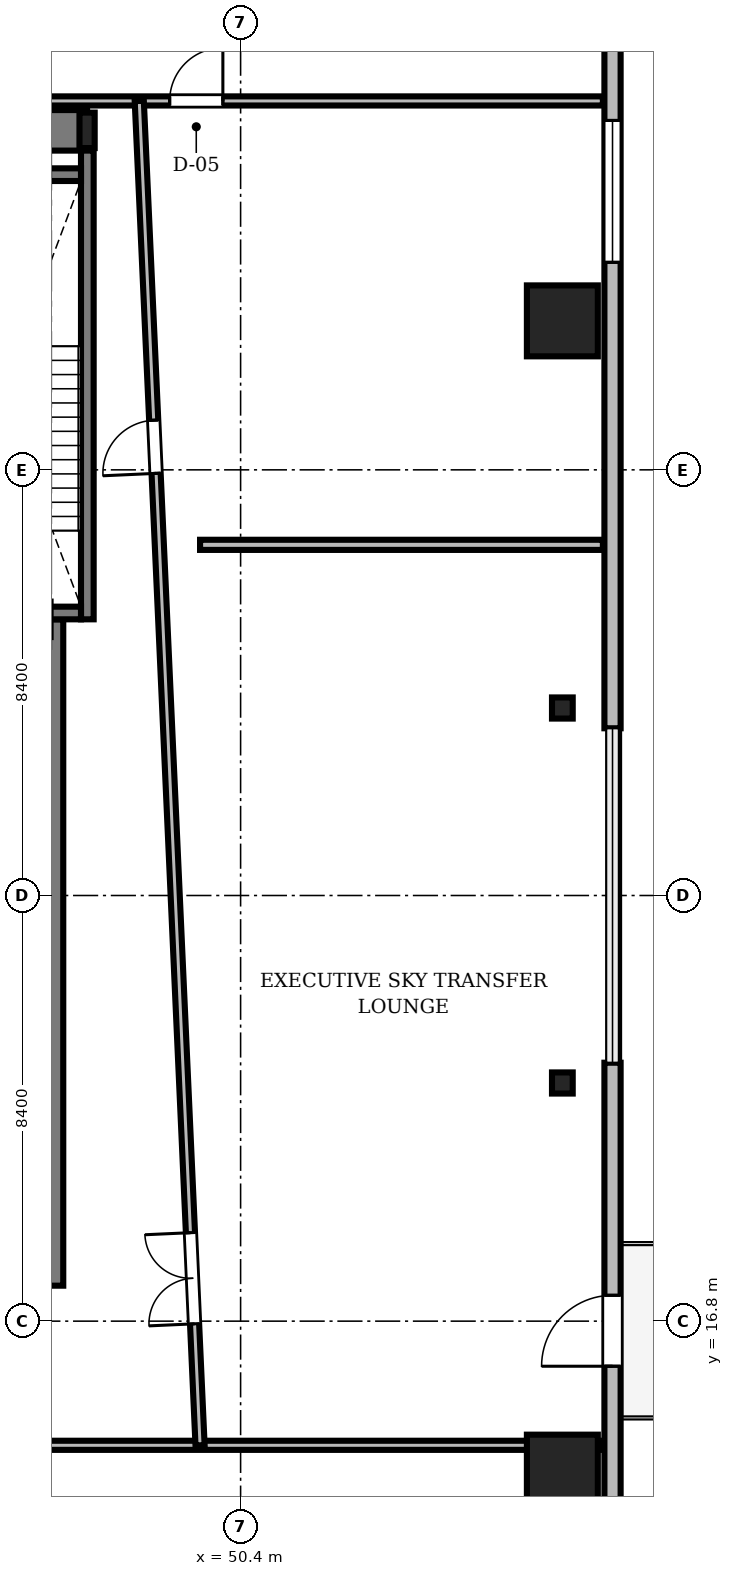
"""IFC4 building model, lengths in metres.
Left out: names, types, materials, properties, quantities, classifications, styles, units other than length and angle.
Written with IfcOpenShell. Run it as: python <this file> out.ifc"""

import sys

from ifc_helpers import new_model, si_unit, direction, frame, frame_2d, origin, origin_2d, place, context, subcontext, project, spatial, rectangle, i_section, extrude, source, transform, mapped, element, fill, save


model = new_model("IFC4")
c1 = context("Model", 3, precision=1e-05, world=origin(), true_north=direction((0.0, 1.0)))
c2 = subcontext(c1, "Body", "Model", "MODEL_VIEW")
j1 = project(units=[si_unit("LENGTHUNIT", "METRE"), si_unit("PLANEANGLEUNIT", "RADIAN")], contexts=[c1])
p1 = place(None, origin())
s1 = spatial("IfcSite", under=j1, at=p1, CompositionType="ELEMENT")
p2 = place(p1, origin())
s2 = spatial("IfcBuilding", under=s1, at=p2, CompositionType="ELEMENT")
p3 = place(p2, frame((0.0, 0.0, 172.2)))
s3 = spatial("IfcBuildingStorey", under=s2, at=p3, CompositionType="ELEMENT", Elevation=172.2)
m1 = source(origin(), c2, "Body", "SweptSolid", [
    extrude(rectangle(XDim=17.52, YDim=0.8, at=frame_2d((8.76, 0.0))), origin(), (0.0, 0.0, 1.0), 4.78),
])
p4 = place(p3, frame((29.85, 40.3, 0.0), z_axis=(0.0, 0.0, 1.0), x_axis=(1.0, 0.0, 0.0)))
e1 = element("IfcWall", 1, at=p4, inside=s3, PredefinedType="SHEAR", context=c2, shape_type="MappedRepresentation", body=[
    mapped(m1, transform((0.0, 0.0, 0.0), scale=1.0)),
])
m2 = source(origin(), c2, "Body", "SweptSolid", [
    extrude(rectangle(XDim=13.15, YDim=0.8, at=frame_2d((6.575, 0.0))), origin(), (0.0, 0.0, 1.0), 4.78),
])
p5 = place(p3, frame((46.5, 17.5, 0.0), z_axis=(0.0, 0.0, 1.0), x_axis=(0.0, 1.0, 0.0)))
e2 = element("IfcWall", 2, at=p5, inside=s3, PredefinedType="SHEAR", context=c2, shape_type="MappedRepresentation", body=[
    mapped(m2, transform((0.0, 0.0, 0.0), scale=1.0)),
])
m3 = source(origin(), c2, "Body", "SweptSolid", [
    extrude(i_section(OverallWidth=0.3, OverallDepth=0.7, WebThickness=0.017, FlangeThickness=0.032, FilletRadius=0.027, at=origin_2d()), origin(), (0.0, 0.0, 1.0), 4.78),
])
p6 = place(p3, frame((47.37, 40.3, 0.0), z_axis=(0.0, 0.0, 1.0), x_axis=(1.0, 0.0, 0.0)))
e3 = element("IfcColumn", 3, at=p6, inside=s3, PredefinedType="COLUMN", context=c2, shape_type="MappedRepresentation", body=[
    mapped(m3, transform((0.0, 0.0, 0.0), scale=1.0)),
])
m4 = source(origin(), c2, "Body", "SweptSolid", [
    extrude(rectangle(XDim=1.4, YDim=1.4, at=origin_2d()), origin(), (0.0, 0.0, 1.0), 4.78),
])
for number, where, z_axis, x_axis in (
    (4, (56.75, 13.86, 0.0), (0.0, 0.0, 1.0), (1.0, 0.0, 0.0)),
    (5, (56.75, 36.54, 0.0), (0.0, 0.0, 1.0), (1.0, 0.0, 0.0)),
):
    element("IfcColumn", number, at=place(p3, frame(where, z_axis=z_axis, x_axis=x_axis)), inside=s3, PredefinedType="COLUMN", context=c2, shape_type="MappedRepresentation", body=[
        mapped(m4, transform((0.0, 0.0, 0.0), scale=1.0)),
    ])
m5 = source(origin(), c2, "Body", "SweptSolid", [
    extrude(i_section(OverallWidth=0.409, OverallDepth=0.417, WebThickness=0.021, FlangeThickness=0.033, FilletRadius=0.015, at=origin_2d()), origin(), (0.0, 0.0, 1.0), 4.78),
])
for number, where, z_axis, x_axis in (
    (6, (56.75, 21.5, 0.0), (0.0, 0.0, 1.0), (1.0, 0.0, 0.0)),
    (7, (56.75, 28.9, 0.0), (0.0, 0.0, 1.0), (1.0, 0.0, 0.0)),
):
    element("IfcColumn", number, at=place(p3, frame(where, z_axis=z_axis, x_axis=x_axis)), inside=s3, PredefinedType="COLUMN", context=c2, shape_type="MappedRepresentation", body=[
        mapped(m5, transform((0.0, 0.0, 0.0), scale=1.0)),
    ])
m6 = source(origin(), c2, "Body", "SweptSolid", [
    extrude(rectangle(XDim=15.6, YDim=0.32, at=frame_2d((7.8, 0.0))), origin(), (0.0, 0.0, 1.0), 4.78),
])
p7 = place(p3, frame((57.74, 6.3, 0.0), z_axis=(0.0, 0.0, 1.0), x_axis=(0.0, 1.0, 0.0)))
e8 = element("IfcWall", 8, at=p7, inside=s3, PredefinedType="SOLIDWALL", context=c2, shape_type="MappedRepresentation", body=[
    mapped(m6, transform((0.0, 0.0, 0.0), scale=1.0)),
])
m7 = source(origin(), c2, "Body", "SweptSolid", [
    extrude(rectangle(XDim=1.4, YDim=2.3, at=frame_2d((0.7, 1.15))), frame((0.0, 0.17, 0.0), z_axis=(0.0, -1.0, 0.0), x_axis=(1.0, 0.0, 0.0)), (0.0, 0.0, 1.0), 0.34),
])
p8 = place(p7, frame((9.61, 0.0, 0.0)))
e9 = element("IfcOpeningElement", 9, at=p8, cuts=e8, PredefinedType="OPENING", context=c2, shape_type="MappedRepresentation", body=[
    mapped(m7, transform((0.0, 0.0, 0.0), scale=1.0)),
])
m8 = source(origin(), c2, "Body", "SweptSolid", [
    extrude(rectangle(XDim=2.8, YDim=2.4, at=frame_2d((1.4, 1.2))), frame((0.0, 0.17, 0.0), z_axis=(0.0, -1.0, 0.0), x_axis=(1.0, 0.0, 0.0)), (0.0, 0.0, 1.0), 0.34),
])
p9 = place(p7, frame((2.705, 0.0, 0.72)))
e10 = element("IfcOpeningElement", 10, at=p9, cuts=e8, PredefinedType="OPENING", context=c2, shape_type="MappedRepresentation", body=[
    mapped(m8, transform((0.0, 0.0, 0.0), scale=1.0)),
])
m9 = source(origin(), c2, "Body", "SweptSolid", [
    extrude(rectangle(XDim=15.6, YDim=0.32, at=frame_2d((7.8, 0.0))), origin(), (0.0, 0.0, 1.0), 4.78),
])
p10 = place(p3, frame((57.74, 28.5, 0.0), z_axis=(0.0, 0.0, 1.0), x_axis=(0.0, 1.0, 0.0)))
e11 = element("IfcWall", 11, at=p10, inside=s3, PredefinedType="SOLIDWALL", context=c2, shape_type="MappedRepresentation", body=[
    mapped(m9, transform((0.0, 0.0, 0.0), scale=1.0)),
])
p11 = place(p10, frame((9.195, 0.0, 0.72)))
e12 = element("IfcOpeningElement", 12, at=p11, cuts=e11, PredefinedType="OPENING", context=c2, shape_type="MappedRepresentation", body=[
    mapped(m8, transform((0.0, 0.0, 0.0), scale=1.0)),
])
m10 = source(origin(), c2, "Body", "SweptSolid", [
    extrude(rectangle(XDim=9.25, YDim=0.25, at=frame_2d((4.625, 0.0))), origin(), (0.0, 0.0, 1.0), 4.8),
])
p12 = place(p3, frame((47.375, 30.65, 0.0), z_axis=(0.0, 0.0, 1.0), x_axis=(0.0, 1.0, 0.0)))
e13 = element("IfcWall", 13, at=p12, inside=s3, PredefinedType="SOLIDWALL", context=c2, shape_type="MappedRepresentation", body=[
    mapped(m10, transform((0.0, 0.0, 0.0), scale=1.0)),
])
m11 = source(origin(), c2, "Body", "SweptSolid", [
    extrude(rectangle(XDim=3.15, YDim=0.25, at=frame_2d((1.575, 0.0))), origin(), (0.0, 0.0, 1.0), 4.8),
])
p13 = place(p3, frame((44.1, 39.425, 0.0), z_axis=(0.0, 0.0, 1.0), x_axis=(1.0, 0.0, 0.0)))
e14 = element("IfcWall", 14, at=p13, inside=s3, PredefinedType="SOLIDWALL", context=c2, shape_type="MappedRepresentation", body=[
    mapped(m11, transform((0.0, 0.0, 0.0), scale=1.0)),
])
p14 = place(p3, frame((44.1, 30.775, 0.0), z_axis=(0.0, 0.0, 1.0), x_axis=(1.0, 0.0, 0.0)))
e15 = element("IfcWall", 15, at=p14, inside=s3, PredefinedType="SOLIDWALL", context=c2, shape_type="MappedRepresentation", body=[
    mapped(m11, transform((0.0, 0.0, 0.0), scale=1.0)),
])
m12 = source(origin(), c2, "Body", "SweptSolid", [
    extrude(rectangle(XDim=1.1, YDim=2.2, at=frame_2d((0.55, 1.1))), frame((0.0, 0.135, 0.0), z_axis=(0.0, -1.0, 0.0), x_axis=(1.0, 0.0, 0.0)), (0.0, 0.0, 1.0), 0.27),
])
p15 = place(p14, frame((0.35, 0.0, 0.0)))
e16 = element("IfcOpeningElement", 16, at=p15, cuts=e15, PredefinedType="OPENING", context=c2, shape_type="MappedRepresentation", body=[
    mapped(m12, transform((0.0, 0.0, 0.0), scale=1.0)),
])
m13 = source(origin(), c2, "Body", "SweptSolid", [
    extrude(rectangle(XDim=46.1, YDim=0.18, at=frame_2d((23.05, 0.0))), origin(), (0.0, 0.0, 1.0), 4.022),
])
p16 = place(p3, frame((11.45, 14.35, 0.0), z_axis=(0.0, 0.0, 1.0), x_axis=(1.0, 0.0, 0.0)))
e17 = element("IfcWall", 17, at=p16, inside=s3, PredefinedType="PARTITIONING", context=c2, shape_type="MappedRepresentation", body=[
    mapped(m13, transform((0.0, 0.0, 0.0), scale=1.0)),
])
m14 = source(origin(), c2, "Body", "SweptSolid", [
    extrude(rectangle(XDim=1.8, YDim=2.4, at=frame_2d((0.9, 1.2))), frame((0.0, 0.1, 0.0), z_axis=(0.0, -1.0, 0.0), x_axis=(1.0, 0.0, 0.0)), (0.0, 0.0, 1.0), 0.2),
])
p17 = place(p16, frame((16.15, 0.0, 0.0)))
e18 = element("IfcOpeningElement", 18, at=p17, cuts=e17, PredefinedType="OPENING", context=c2, shape_type="MappedRepresentation", body=[
    mapped(m14, transform((0.0, 0.0, 0.0), scale=1.0)),
])
p18 = place(p16, frame((30.75, 0.0, 0.0)))
e19 = element("IfcOpeningElement", 19, at=p18, cuts=e17, PredefinedType="OPENING", context=c2, shape_type="MappedRepresentation", body=[
    mapped(m14, transform((0.0, 0.0, 0.0), scale=1.0)),
])
m15 = source(origin(), c2, "Body", "SweptSolid", [
    extrude(rectangle(XDim=28.8, YDim=0.18, at=frame_2d((14.4, 0.0))), origin(), (0.0, 0.0, 1.0), 4.022),
])
p19 = place(p3, frame((28.75, 40.88, 0.0), z_axis=(0.0, 0.0, 1.0), x_axis=(1.0, 0.0, 0.0)))
e20 = element("IfcWall", 20, at=p19, inside=s3, PredefinedType="PARTITIONING", context=c2, shape_type="MappedRepresentation", body=[
    mapped(m15, transform((0.0, 0.0, 0.0), scale=1.0)),
])
m16 = source(origin(), c2, "Body", "SweptSolid", [
    extrude(rectangle(XDim=1.05, YDim=2.2, at=frame_2d((0.525, 1.1))), frame((0.0, 0.1, 0.0), z_axis=(0.0, -1.0, 0.0), x_axis=(1.0, 0.0, 0.0)), (0.0, 0.0, 1.0), 0.2),
])
p20 = place(p19, frame((20.25, 0.0, 0.0)))
e21 = element("IfcOpeningElement", 21, at=p20, cuts=e20, PredefinedType="OPENING", context=c2, shape_type="MappedRepresentation", body=[
    mapped(m16, transform((0.0, 0.0, 0.0), scale=1.0)),
])
m17 = source(origin(), c2, "Body", "SweptSolid", [
    extrude(rectangle(XDim=26.557, YDim=0.18, at=frame_2d((13.278, 0.0))), origin(), (0.0, 0.0, 1.0), 4.222),
])
p21 = place(p3, frame((49.6, 14.35, 0.0), z_axis=(0.0, 0.0, 1.0), x_axis=(-0.045193318299, 0.998978260014, 0.0)))
e22 = element("IfcWall", 22, at=p21, inside=s3, PredefinedType="PARTITIONING", context=c2, shape_type="MappedRepresentation", body=[
    mapped(m17, transform((0.0, 0.0, 0.0), scale=1.0)),
])
p22 = place(p21, frame((2.4, 0.0, 0.0)))
e23 = element("IfcOpeningElement", 23, at=p22, cuts=e22, PredefinedType="OPENING", context=c2, shape_type="MappedRepresentation", body=[
    mapped(m14, transform((0.0, 0.0, 0.0), scale=1.0)),
])
p23 = place(p21, frame((19.2, 0.0, 0.0)))
e24 = element("IfcOpeningElement", 24, at=p23, cuts=e22, PredefinedType="OPENING", context=c2, shape_type="MappedRepresentation", body=[
    mapped(m16, transform((0.0, 0.0, 0.0), scale=1.0)),
])
m18 = source(origin(), c2, "Body", "SweptSolid", [
    extrude(rectangle(XDim=7.95, YDim=0.2, at=frame_2d((3.975, 0.0))), origin(), (0.0, 0.0, 1.0), 4.022),
])
p24 = place(p3, frame((49.6, 32.12, 0.0), z_axis=(0.0, 0.0, 1.0), x_axis=(1.0, 0.0, 0.0)))
e25 = element("IfcWall", 25, at=p24, inside=s3, PredefinedType="PARTITIONING", context=c2, shape_type="MappedRepresentation", body=[
    mapped(m18, transform((0.0, 0.0, 0.0), scale=1.0)),
])
m19 = source(origin(), c2, "Body", "SweptSolid", [
    extrude(rectangle(XDim=1.4, YDim=2.3, at=frame_2d((0.7, 1.15))), frame((0.0, 0.025, 0.0), z_axis=(0.0, -1.0, 0.0), x_axis=(1.0, 0.0, 0.0)), (0.0, 0.0, 1.0), 0.05),
])
p25 = place(p8, frame((1.4, 0.0, 0.0), z_axis=(0.0, 0.0, 1.0), x_axis=(-1.0, 0.0, 0.0)))
e26 = element("IfcDoor", 26, at=p25, inside=s3, OperationType="DOUBLE_DOOR_SLIDING", PredefinedType="DOOR", context=c2, shape_type="MappedRepresentation", body=[
    mapped(m19, transform((0.0, 0.0, 0.0), scale=1.0)),
])
fill(e9, e26)
m20 = source(origin(), c2, "Body", "SweptSolid", [
    extrude(rectangle(XDim=2.8, YDim=2.4, at=frame_2d((1.4, 1.2))), frame((0.0, 0.03, 0.0), z_axis=(0.0, -1.0, 0.0), x_axis=(1.0, 0.0, 0.0)), (0.0, 0.0, 1.0), 0.06),
])
p26 = place(p11, origin())
e27 = element("IfcWindow", 27, at=p26, inside=s3, PartitioningType="SINGLE_PANEL", PredefinedType="WINDOW", context=c2, shape_type="MappedRepresentation", body=[
    mapped(m20, transform((0.0, 0.0, 0.0), scale=1.0)),
])
fill(e12, e27)
m21 = source(origin(), c2, "Body", "SweptSolid", [
    extrude(rectangle(XDim=1.05, YDim=2.2, at=frame_2d((0.525, 1.1))), frame((0.0, 0.025, 0.0), z_axis=(0.0, -1.0, 0.0), x_axis=(1.0, 0.0, 0.0)), (0.0, 0.0, 1.0), 0.05),
])
p27 = place(p20, origin())
e28 = element("IfcDoor", 28, at=p27, inside=s3, OperationType="SINGLE_SWING_RIGHT", PredefinedType="DOOR", context=c2, shape_type="MappedRepresentation", body=[
    mapped(m21, transform((0.0, 0.0, 0.0), scale=1.0)),
])
fill(e21, e28)
m22 = source(origin(), c2, "Body", "SweptSolid", [
    extrude(rectangle(XDim=1.8, YDim=2.4, at=frame_2d((0.9, 1.2))), frame((0.0, 0.025, 0.0), z_axis=(0.0, -1.0, 0.0), x_axis=(1.0, 0.0, 0.0)), (0.0, 0.0, 1.0), 0.05),
])
p28 = place(p22, origin())
e29 = element("IfcDoor", 29, at=p28, inside=s3, OperationType="DOUBLE_DOOR_SINGLE_SWING", PredefinedType="DOOR", context=c2, shape_type="MappedRepresentation", body=[
    mapped(m22, transform((0.0, 0.0, 0.0), scale=1.0)),
])
fill(e23, e29)
p29 = place(p23, origin())
e30 = element("IfcDoor", 30, at=p29, inside=s3, OperationType="SINGLE_SWING_LEFT", PredefinedType="DOOR", context=c2, shape_type="MappedRepresentation", body=[
    mapped(m21, transform((0.0, 0.0, 0.0), scale=1.0)),
])
fill(e24, e30)
save(model, sys.argv[1])
